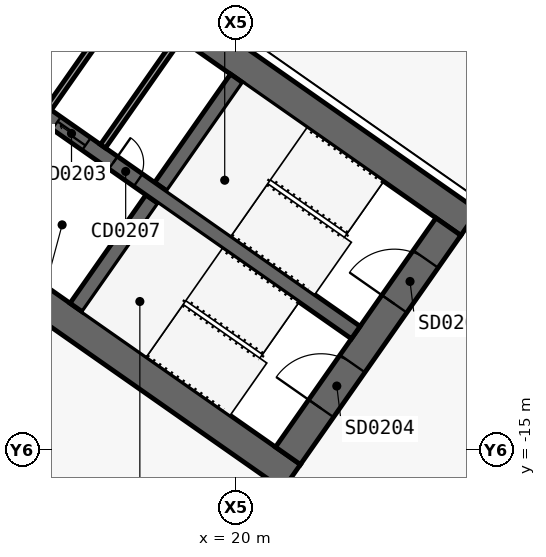
"""IFC4 building model, lengths in metres.
Left out: names, types, materials, properties, quantities, classifications, styles, units other than length and angle.
Written with IfcOpenShell. Run it as: python <this file> out.ifc"""

import sys

from ifc_helpers import new_model, si_unit, direction, frame, frame_2d, origin, place, context, subcontext, project, spatial, polyline, rectangle, outline, extrude, element, fill, save


model = new_model("IFC4")
c1 = context("Model", 3, precision=1e-05, world=origin(), true_north=direction((0.0, 1.0)))
c2 = subcontext(c1, "Body", "Model", "MODEL_VIEW")
j1 = project(units=[si_unit("LENGTHUNIT", "METRE"), si_unit("PLANEANGLEUNIT", "RADIAN")], contexts=[c1])
p1 = place(None, origin())
s1 = spatial("IfcSite", under=j1, at=p1, CompositionType="ELEMENT")
p2 = place(p1, origin())
s2 = spatial("IfcBuilding", under=s1, at=p2, CompositionType="ELEMENT")
p3 = place(p2, frame((0.0, 0.0, -4.5)))
s3 = spatial("IfcBuildingStorey", under=s2, at=p3, CompositionType="ELEMENT", Elevation=-4.5)
p4 = place(p3, frame((-0.037, 11.867, 0.0), z_axis=(0.0, 0.0, 1.0), x_axis=(0.819155306259, -0.573571777746, 0.0)))
e1 = element("IfcWall", 1, at=p4, inside=s3, PredefinedType="SHEAR", context=c2, shape_type="SweptSolid", body=[
    extrude(outline(polyline([(33.837, 0.5), (0.0, 0.5), (0.7, -0.5), (33.837, -0.5), (33.837, 0.5)])), origin(), (0.0, 0.0, 1.0), 4.5),
])
p5 = place(p3, frame((-0.037, -0.585, 0.0), z_axis=(0.0, 0.0, 1.0), x_axis=(0.819157152511, -0.573569140985, 0.0)))
e2 = element("IfcWall", 2, at=p5, inside=s3, PredefinedType="SHEAR", context=c2, shape_type="SweptSolid", body=[
    extrude(outline(polyline([(26.695, 0.5), (0.0, 0.5), (0.7, -0.5), (26.695, -0.5), (26.695, 0.5)])), origin(), (0.0, 0.0, 1.0), 4.5),
])
p6 = place(p5, frame((3.895, 0.0, 0.0)))
e3 = element("IfcOpeningElement", 3, at=p6, cuts=e2, PredefinedType="OPENING", context=c2, shape_type="SweptSolid", body=[
    extrude(rectangle(XDim=1.2, YDim=2.1, at=frame_2d((0.6, 1.05))), frame((0.0, 0.51, 0.0), z_axis=(0.0, -1.0, 0.0), x_axis=(1.0, 0.0, 0.0)), (0.0, 0.0, 1.0), 1.02),
])
p7 = place(p5, frame((12.445, 0.0, 0.0)))
e4 = element("IfcOpeningElement", 4, at=p7, cuts=e2, PredefinedType="OPENING", context=c2, shape_type="SweptSolid", body=[
    extrude(rectangle(XDim=1.5, YDim=2.1, at=frame_2d((0.75, 1.05))), frame((0.0, 0.51, 0.0), z_axis=(0.0, -1.0, 0.0), x_axis=(1.0, 0.0, 0.0)), (0.0, 0.0, 1.0), 1.02),
])
p8 = place(p3, frame((21.708, -15.2, 0.0), z_axis=(0.0, 0.0, 1.0), x_axis=(0.573576324356, 0.819152122709, 0.0)))
e5 = element("IfcWall", 5, at=p8, inside=s3, PredefinedType="SHEAR", context=c2, shape_type="SweptSolid", body=[
    extrude(outline(polyline([(9.2, 0.5), (0.0, 0.5), (0.0, -0.5), (9.2, -0.5), (9.2, 0.5)])), origin(), (0.0, 0.0, 1.0), 4.5),
])
p9 = place(p8, frame((6.1, 0.0, 0.0)))
e6 = element("IfcOpeningElement", 6, at=p9, cuts=e5, PredefinedType="OPENING", context=c2, shape_type="SweptSolid", body=[
    extrude(rectangle(XDim=1.8, YDim=2.1, at=frame_2d((0.9, 1.05))), frame((0.0, 0.51, 0.0), z_axis=(0.0, -1.0, 0.0), x_axis=(1.0, 0.0, 0.0)), (0.0, 0.0, 1.0), 1.02),
])
p10 = place(p8, frame((1.9, 0.0, 0.0)))
e7 = element("IfcOpeningElement", 7, at=p10, cuts=e5, PredefinedType="OPENING", context=c2, shape_type="SweptSolid", body=[
    extrude(rectangle(XDim=1.8, YDim=2.1, at=frame_2d((0.9, 1.05))), frame((0.0, 0.51, 0.0), z_axis=(0.0, -1.0, 0.0), x_axis=(1.0, 0.0, 0.0)), (0.0, 0.0, 1.0), 1.02),
])
p11 = place(p3, frame((14.745, -10.324, 0.0), z_axis=(0.0, 0.0, 1.0), x_axis=(0.57356780395, 0.819158088694, 0.0)))
e8 = element("IfcWall", 8, at=p11, inside=s3, PredefinedType="SHEAR", context=c2, shape_type="SweptSolid", body=[
    extrude(outline(polyline([(0.0, 0.25), (0.0, -0.25), (4.35, -0.25), (4.35, 0.25), (0.0, 0.25)])), origin(), (0.0, 0.0, 1.0), 4.5),
])
p12 = place(p3, frame((17.527, -6.352, 0.0), z_axis=(0.0, 0.0, 1.0), x_axis=(0.573530143085, 0.819184457233, 0.0)))
e9 = element("IfcWall", 9, at=p12, inside=s3, PredefinedType="SHEAR", context=c2, shape_type="SweptSolid", body=[
    extrude(outline(polyline([(4.35, -0.25), (4.35, 0.25), (0.0, 0.25), (0.0, -0.25), (4.35, -0.25)])), origin(), (0.0, 0.0, 1.0), 4.5),
])
p13 = place(p3, frame((2.638, 3.768, 0.0), z_axis=(0.0, 0.0, 1.0), x_axis=(0.819148977158, -0.573580816643, 0.0)))
e10 = element("IfcWall", 10, at=p13, inside=s3, PredefinedType="SHEAR", context=c2, shape_type="SweptSolid", body=[
    extrude(outline(polyline([(0.0, 0.25), (0.0, -0.25), (26.0, -0.25), (26.0, 0.25), (0.0, 0.25)])), origin(), (0.0, 0.0, 1.0), 4.5),
])
p14 = place(p13, frame((9.637, 0.0, 0.0)))
e11 = element("IfcOpeningElement", 11, at=p14, cuts=e10, PredefinedType="OPENING", context=c2, shape_type="SweptSolid", body=[
    extrude(rectangle(XDim=1.2, YDim=2.1, at=frame_2d((0.6, 1.05))), frame((0.0, 0.26, 0.0), z_axis=(0.0, -1.0, 0.0), x_axis=(1.0, 0.0, 0.0)), (0.0, 0.0, 1.0), 0.52),
])
p15 = place(p13, frame((11.812, 0.0, 0.0)))
e12 = element("IfcOpeningElement", 12, at=p15, cuts=e10, PredefinedType="OPENING", context=c2, shape_type="SweptSolid", body=[
    extrude(rectangle(XDim=1.2, YDim=2.1, at=frame_2d((0.6, 1.05))), frame((0.0, 0.26, 0.0), z_axis=(0.0, -1.0, 0.0), x_axis=(1.0, 0.0, 0.0)), (0.0, 0.0, 1.0), 0.52),
])
p16 = place(p13, frame((13.988, 0.0, 0.0)))
e13 = element("IfcOpeningElement", 13, at=p16, cuts=e10, PredefinedType="OPENING", context=c2, shape_type="SweptSolid", body=[
    extrude(rectangle(XDim=1.2, YDim=2.1, at=frame_2d((0.6, 1.05))), frame((0.0, 0.26, 0.0), z_axis=(0.0, -1.0, 0.0), x_axis=(1.0, 0.0, 0.0)), (0.0, 0.0, 1.0), 0.52),
])
p17 = place(p13, frame((16.262, 0.0, 0.0)))
e14 = element("IfcOpeningElement", 14, at=p17, cuts=e10, PredefinedType="OPENING", context=c2, shape_type="SweptSolid", body=[
    extrude(rectangle(XDim=1.0, YDim=2.1, at=frame_2d((0.5, 1.05))), frame((0.0, 0.26, 0.0), z_axis=(0.0, -1.0, 0.0), x_axis=(1.0, 0.0, 0.0)), (0.0, 0.0, 1.0), 0.52),
])
p18 = place(p3, frame((12.059, -2.523, 0.0), z_axis=(0.0, 0.0, 1.0), x_axis=(0.573594173421, 0.819139624372, 0.0)))
e15 = element("IfcWall", 15, at=p18, inside=s3, PredefinedType="SOLIDWALL", context=c2, shape_type="SweptSolid", body=[
    extrude(rectangle(XDim=4.35, YDim=0.2, at=frame_2d((2.175, 0.0))), origin(), (0.0, 0.0, 1.0), 4.5),
])
p19 = place(p3, frame((13.84, -3.771, 0.0), z_axis=(0.0, 0.0, 1.0), x_axis=(0.57356780395, 0.819158088694, 0.0)))
e16 = element("IfcWall", 16, at=p19, inside=s3, PredefinedType="SOLIDWALL", context=c2, shape_type="SweptSolid", body=[
    extrude(rectangle(XDim=4.35, YDim=0.2, at=frame_2d((2.175, 0.0))), origin(), (0.0, 0.0, 1.0), 4.5),
])
p20 = place(p3, frame((15.622, -5.018, 0.0), z_axis=(0.0, 0.0, 1.0), x_axis=(0.573594173421, 0.819139624372, 0.0)))
e17 = element("IfcWall", 17, at=p20, inside=s3, PredefinedType="SOLIDWALL", context=c2, shape_type="SweptSolid", body=[
    extrude(rectangle(XDim=4.35, YDim=0.2, at=frame_2d((2.175, 0.0))), origin(), (0.0, 0.0, 1.0), 4.5),
])
p21 = place(p16, origin())
e18 = element("IfcDoor", 18, at=p21, inside=s3, OperationType="SLIDING_TO_LEFT", PredefinedType="DOOR", context=c2, shape_type="SweptSolid", body=[
    extrude(rectangle(XDim=1.2, YDim=2.1, at=frame_2d((0.6, 1.05))), frame((0.0, 0.025, 0.0), z_axis=(0.0, -1.0, 0.0), x_axis=(1.0, 0.0, 0.0)), (0.0, 0.0, 1.0), 0.05),
])
fill(e13, e18)
p22 = place(p17, origin())
e19 = element("IfcDoor", 19, at=p22, inside=s3, OperationType="SINGLE_SWING_RIGHT", PredefinedType="DOOR", context=c2, shape_type="SweptSolid", body=[
    extrude(rectangle(XDim=1.0, YDim=2.1, at=frame_2d((0.5, 1.05))), frame((0.0, 0.025, 0.0), z_axis=(0.0, -1.0, 0.0), x_axis=(1.0, 0.0, 0.0)), (0.0, 0.0, 1.0), 0.05),
])
fill(e14, e19)
p23 = place(p9, origin())
e20 = element("IfcDoor", 20, at=p23, inside=s3, OperationType="DOUBLE_DOOR_SINGLE_SWING", PredefinedType="DOOR", context=c2, shape_type="SweptSolid", body=[
    extrude(rectangle(XDim=1.8, YDim=2.1, at=frame_2d((0.9, 1.05))), frame((0.0, 0.025, 0.0), z_axis=(0.0, -1.0, 0.0), x_axis=(1.0, 0.0, 0.0)), (0.0, 0.0, 1.0), 0.05),
])
fill(e6, e20)
p24 = place(p10, origin())
e21 = element("IfcDoor", 21, at=p24, inside=s3, OperationType="DOUBLE_DOOR_SINGLE_SWING", PredefinedType="DOOR", context=c2, shape_type="SweptSolid", body=[
    extrude(rectangle(XDim=1.8, YDim=2.1, at=frame_2d((0.9, 1.05))), frame((0.0, 0.025, 0.0), z_axis=(0.0, -1.0, 0.0), x_axis=(1.0, 0.0, 0.0)), (0.0, 0.0, 1.0), 0.05),
])
fill(e7, e21)
save(model, sys.argv[1])
